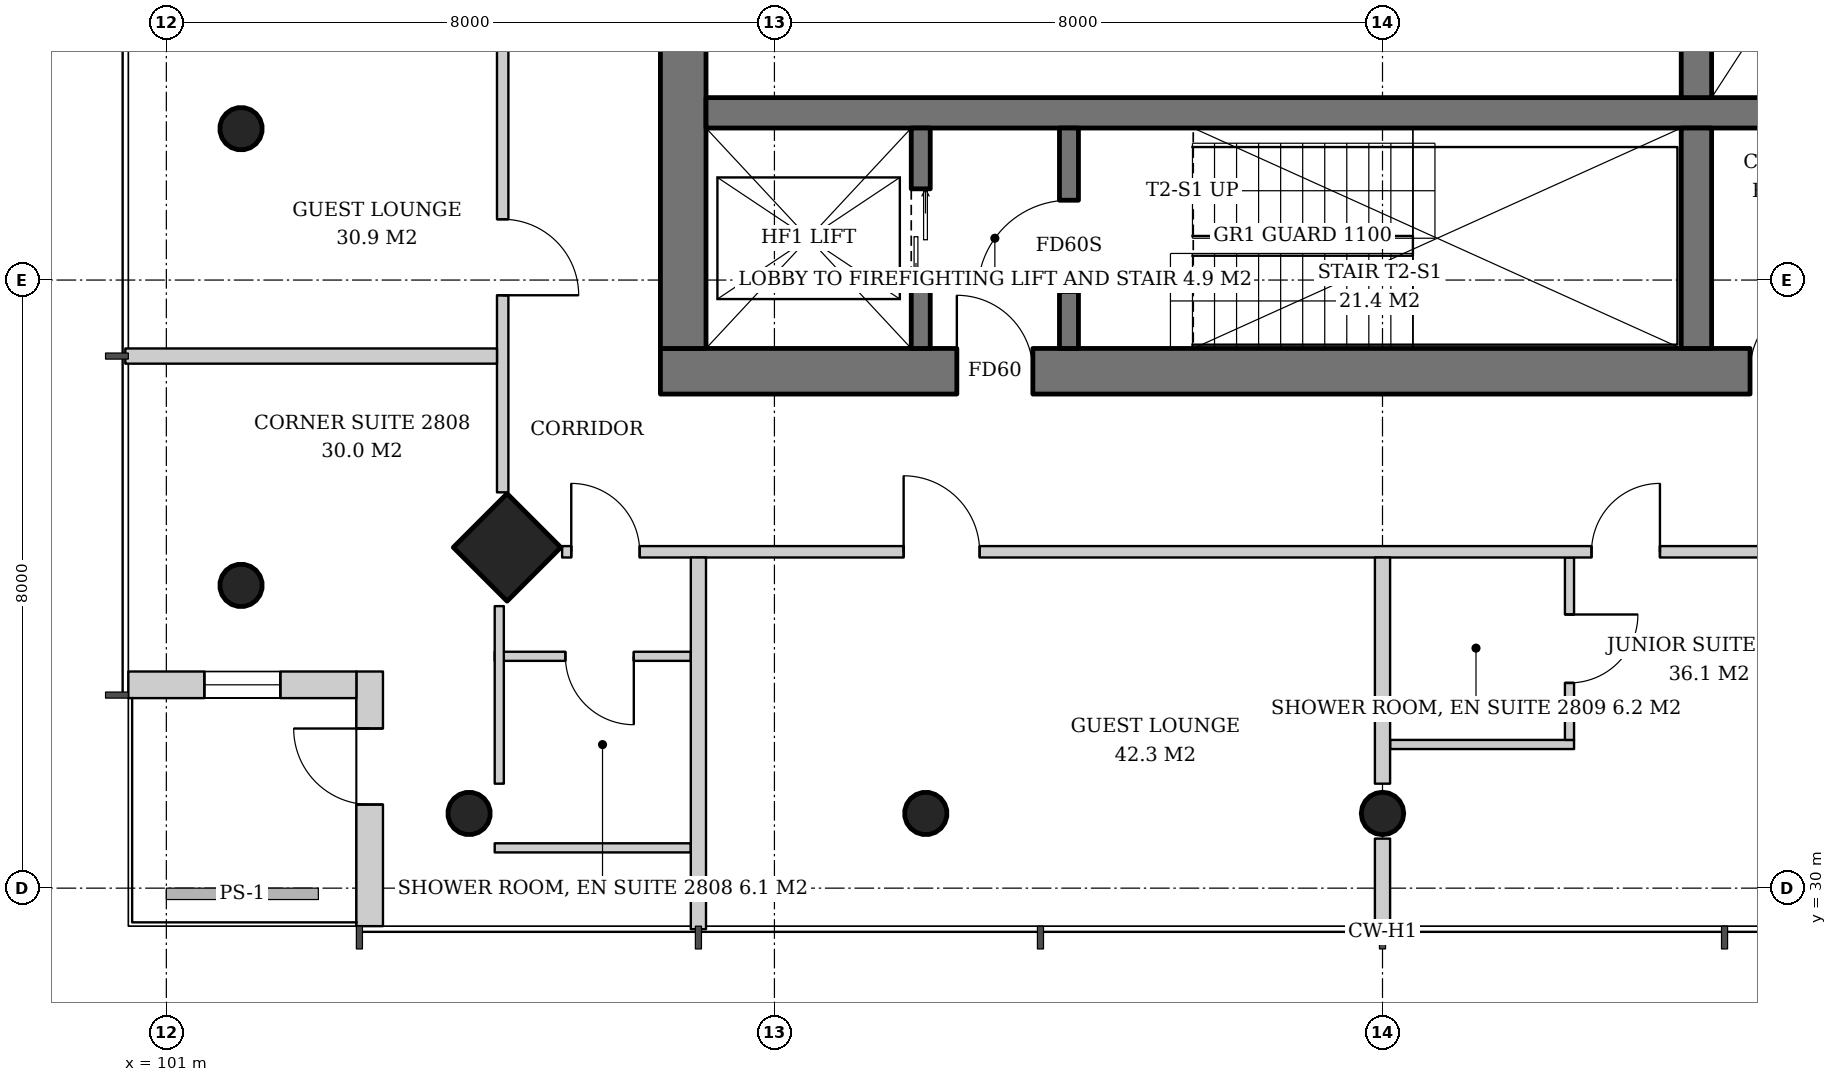
"""IFC4 building model, lengths in metres.
Left out: names, types, materials, properties, quantities, classifications, styles, units other than length and angle.
Written with IfcOpenShell. Run it as: python <this file> out.ifc"""

import sys

from ifc_helpers import new_model, si_unit, direction, frame, frame_2d, origin, origin_2d, place, context, subcontext, project, spatial, rectangle, hollow_circle, extrude, element, fill, save


model = new_model("IFC4")
c1 = context("Model", 3, precision=1e-05, world=origin(), true_north=direction((0.0, 1.0)))
c2 = subcontext(c1, "Body", "Model", "MODEL_VIEW")
j1 = project(units=[si_unit("LENGTHUNIT", "METRE"), si_unit("PLANEANGLEUNIT", "RADIAN")], contexts=[c1])
p1 = place(None, origin())
s1 = spatial("IfcSite", under=j1, at=p1, CompositionType="ELEMENT")
p2 = place(p1, origin())
s2 = spatial("IfcBuilding", under=s1, at=p2, CompositionType="ELEMENT")
p3 = place(p2, frame((0.0, 0.0, 112.2)))
s3 = spatial("IfcBuildingStorey", under=s2, at=p3, CompositionType="ELEMENT", Elevation=112.2)
p4 = place(p3, frame((105.431, 34.431, 0.0), z_axis=(0.042965756413, 0.042965756413, 0.998152236661), x_axis=(-0.707106781187, 0.707106781187, 0.0)))
e1 = element("IfcColumn", 1, at=p4, inside=s3, PredefinedType="COLUMN", context=c2, shape_type="SweptSolid", body=[
    extrude(rectangle(XDim=1.0, YDim=1.0, at=origin_2d()), origin(), (0.0, 0.0, 1.0), 3.807),
])
p5 = place(p3, frame((101.931, 33.931, 0.0), z_axis=(0.042965756413, 0.042965756413, 0.998152236661), x_axis=(-0.707106781187, 0.707106781187, 0.0)))
e2 = element("IfcColumn", 2, at=p5, inside=s3, PredefinedType="COLUMN", context=c2, shape_type="SweptSolid", body=[
    extrude(hollow_circle(Radius=0.28, WallThickness=0.02, at=origin_2d()), origin(), (0.0, 0.0, 1.0), 3.807),
])
p6 = place(p3, frame((101.931, 39.966, 0.0), z_axis=(0.042995531285, 0.021497765643, 0.998843946952), x_axis=(-0.4472135955, 0.894427191, 0.0)))
e3 = element("IfcColumn", 3, at=p6, inside=s3, PredefinedType="COLUMN", context=c2, shape_type="SweptSolid", body=[
    extrude(hollow_circle(Radius=0.28, WallThickness=0.02, at=origin_2d()), origin(), (0.0, 0.0, 1.0), 3.804),
])
p7 = place(p3, frame((104.931, 30.931, 0.0), z_axis=(0.042965756413, 0.042965756413, 0.998152236661), x_axis=(-0.707106781187, 0.707106781187, 0.0)))
e4 = element("IfcColumn", 4, at=p7, inside=s3, PredefinedType="COLUMN", context=c2, shape_type="SweptSolid", body=[
    extrude(hollow_circle(Radius=0.28, WallThickness=0.02, at=origin_2d()), origin(), (0.0, 0.0, 1.0), 3.807),
])
p8 = place(p3, frame((110.966, 30.931, 0.0), z_axis=(0.021497765643, 0.042995531285, 0.998843946952), x_axis=(-0.894427191, 0.4472135955, 0.0)))
e5 = element("IfcColumn", 5, at=p8, inside=s3, PredefinedType="COLUMN", context=c2, shape_type="SweptSolid", body=[
    extrude(hollow_circle(Radius=0.28, WallThickness=0.02, at=origin_2d()), origin(), (0.0, 0.0, 1.0), 3.804),
])
p9 = place(p3, frame((117.0, 30.931, 0.0), z_axis=(0.0, 0.043005470007, 0.999074836811), x_axis=(-1.0, 0.0, 0.0)))
e6 = element("IfcColumn", 6, at=p9, inside=s3, PredefinedType="COLUMN", context=c2, shape_type="SweptSolid", body=[
    extrude(hollow_circle(Radius=0.28, WallThickness=0.02, at=origin_2d()), origin(), (0.0, 0.0, 1.0), 3.803),
])
p10 = place(p3, frame((107.5, 36.8, 0.0), z_axis=(0.0, 0.0, 1.0), x_axis=(1.0, 0.0, 0.0)))
e7 = element("IfcWall", 7, at=p10, inside=s3, PredefinedType="SHEAR", context=c2, shape_type="SweptSolid", body=[
    extrude(rectangle(XDim=19.0, YDim=0.6, at=frame_2d((9.5, 0.0))), origin(), (0.0, 0.0, 1.0), 3.8),
])
p11 = place(p10, frame((3.9, 0.0, 0.0)))
e8 = element("IfcOpeningElement", 8, at=p11, cuts=e7, PredefinedType="OPENING", context=c2, shape_type="SweptSolid", body=[
    extrude(rectangle(XDim=1.0, YDim=2.1, at=frame_2d((0.5, 1.05))), frame((0.0, 0.31, 0.0), z_axis=(0.0, -1.0, 0.0), x_axis=(1.0, 0.0, 0.0)), (0.0, 0.0, 1.0), 0.62),
])
p12 = place(p10, frame((14.335, 0.0, 0.0)))
e9 = element("IfcOpeningElement", 9, at=p12, cuts=e7, PredefinedType="OPENING", context=c2, shape_type="SweptSolid", body=[
    extrude(rectangle(XDim=1.0, YDim=2.1, at=frame_2d((0.5, 1.05))), frame((0.0, 0.31, 0.0), z_axis=(0.0, -1.0, 0.0), x_axis=(1.0, 0.0, 0.0)), (0.0, 0.0, 1.0), 0.62),
])
p13 = place(p10, frame((16.2, 0.0, 0.0)))
e10 = element("IfcOpeningElement", 10, at=p13, cuts=e7, PredefinedType="OPENING", context=c2, shape_type="SweptSolid", body=[
    extrude(rectangle(XDim=1.0, YDim=2.1, at=frame_2d((0.5, 1.05))), frame((0.0, 0.31, 0.0), z_axis=(0.0, -1.0, 0.0), x_axis=(1.0, 0.0, 0.0)), (0.0, 0.0, 1.0), 0.62),
])
p14 = place(p3, frame((107.8, 37.1, 0.0), z_axis=(0.0, 0.0, 1.0), x_axis=(0.0, 1.0, 0.0)))
e11 = element("IfcWall", 11, at=p14, inside=s3, PredefinedType="SHEAR", context=c2, shape_type="SweptSolid", body=[
    extrude(rectangle(XDim=17.8, YDim=0.6, at=frame_2d((8.9, 0.0))), origin(), (0.0, 0.0, 1.0), 3.8),
])
p15 = place(p14, frame((8.0, 0.0, 0.0)))
e12 = element("IfcOpeningElement", 12, at=p15, cuts=e11, PredefinedType="OPENING", context=c2, shape_type="SweptSolid", body=[
    extrude(rectangle(XDim=1.8, YDim=2.4, at=frame_2d((0.9, 1.2))), frame((0.0, 0.31, 0.0), z_axis=(0.0, -1.0, 0.0), x_axis=(1.0, 0.0, 0.0)), (0.0, 0.0, 1.0), 0.62),
])
p16 = place(p3, frame((108.1, 40.2, 0.0), z_axis=(0.0, 0.0, 1.0), x_axis=(1.0, 0.0, 0.0)))
e13 = element("IfcWall", 13, at=p16, inside=s3, PredefinedType="SHEAR", context=c2, shape_type="SweptSolid", body=[
    extrude(rectangle(XDim=17.8, YDim=0.4, at=frame_2d((8.9, 0.0))), origin(), (0.0, 0.0, 1.0), 3.8),
])
p17 = place(p3, frame((121.13, 37.1, 0.0), z_axis=(0.0, 0.0, 1.0), x_axis=(0.0, 1.0, 0.0)))
e14 = element("IfcWall", 14, at=p17, inside=s3, PredefinedType="SHEAR", context=c2, shape_type="SweptSolid", body=[
    extrude(rectangle(XDim=2.9, YDim=0.4, at=frame_2d((1.45, 0.0))), origin(), (0.0, 0.0, 1.0), 3.8),
])
p18 = place(p3, frame((121.13, 40.4, 0.0), z_axis=(0.0, 0.0, 1.0), x_axis=(0.0, 1.0, 0.0)))
e15 = element("IfcWall", 15, at=p18, inside=s3, PredefinedType="SHEAR", context=c2, shape_type="SweptSolid", body=[
    extrude(rectangle(XDim=11.2, YDim=0.4, at=frame_2d((5.6, 0.0))), origin(), (0.0, 0.0, 1.0), 3.8),
])
p19 = place(p3, frame((103.675, 29.5, 0.0), z_axis=(0.0, 0.0, 1.0), x_axis=(0.0, 1.0, 0.0)))
e16 = element("IfcWall", 16, at=p19, inside=s3, PredefinedType="SOLIDWALL", context=c2, shape_type="SweptSolid", body=[
    extrude(rectangle(XDim=3.35, YDim=0.35, at=frame_2d((1.675, 0.0))), origin(), (0.0, 0.0, 1.0), 3.6),
])
p20 = place(p19, frame((1.6, 0.0, 0.0)))
e17 = element("IfcOpeningElement", 17, at=p20, cuts=e16, PredefinedType="OPENING", context=c2, shape_type="SweptSolid", body=[
    extrude(rectangle(XDim=1.0, YDim=2.4, at=frame_2d((0.5, 1.2))), frame((0.0, 0.185, 0.0), z_axis=(0.0, -1.0, 0.0), x_axis=(1.0, 0.0, 0.0)), (0.0, 0.0, 1.0), 0.37),
])
p21 = place(p3, frame((103.5, 32.675, 0.0), z_axis=(0.0, 0.0, 1.0), x_axis=(-1.0, 0.0, 0.0)))
e18 = element("IfcWall", 18, at=p21, inside=s3, PredefinedType="SOLIDWALL", context=c2, shape_type="SweptSolid", body=[
    extrude(rectangle(XDim=3.0, YDim=0.35, at=frame_2d((1.5, 0.0))), origin(), (0.0, 0.0, 1.0), 3.6),
])
p22 = place(p21, frame((1.0, 0.0, 0.9)))
e19 = element("IfcOpeningElement", 19, at=p22, cuts=e18, PredefinedType="OPENING", context=c2, shape_type="SweptSolid", body=[
    extrude(rectangle(XDim=1.0, YDim=2.4, at=frame_2d((0.5, 1.2))), frame((0.0, 0.185, 0.0), z_axis=(0.0, -1.0, 0.0), x_axis=(1.0, 0.0, 0.0)), (0.0, 0.0, 1.0), 0.37),
])
p23 = place(p3, frame((110.925, 37.1, 0.0), z_axis=(0.0, 0.0, 1.0), x_axis=(0.0, 1.0, 0.0)))
e20 = element("IfcWall", 20, at=p23, inside=s3, PredefinedType="SHEAR", context=c2, shape_type="SweptSolid", body=[
    extrude(rectangle(XDim=2.9, YDim=0.25, at=frame_2d((1.45, 0.0))), origin(), (0.0, 0.0, 1.0), 3.8),
])
p24 = place(p23, frame((0.8, 0.0, 0.0)))
e21 = element("IfcOpeningElement", 21, at=p24, cuts=e20, PredefinedType="OPENING", context=c2, shape_type="SweptSolid", body=[
    extrude(rectangle(XDim=1.3, YDim=2.2, at=frame_2d((0.65, 1.1))), frame((0.0, 0.135, 0.0), z_axis=(0.0, -1.0, 0.0), x_axis=(1.0, 0.0, 0.0)), (0.0, 0.0, 1.0), 0.27),
])
p25 = place(p3, frame((112.875, 37.1, 0.0), z_axis=(0.0, 0.0, 1.0), x_axis=(0.0, 1.0, 0.0)))
e22 = element("IfcWall", 22, at=p25, inside=s3, PredefinedType="SHEAR", context=c2, shape_type="SweptSolid", body=[
    extrude(rectangle(XDim=2.9, YDim=0.25, at=frame_2d((1.45, 0.0))), origin(), (0.0, 0.0, 1.0), 3.8),
])
p26 = place(p25, frame((0.75, 0.0, 0.0)))
e23 = element("IfcOpeningElement", 23, at=p26, cuts=e22, PredefinedType="OPENING", context=c2, shape_type="SweptSolid", body=[
    extrude(rectangle(XDim=1.2, YDim=2.1, at=frame_2d((0.6, 1.05))), frame((0.0, 0.135, 0.0), z_axis=(0.0, -1.0, 0.0), x_axis=(1.0, 0.0, 0.0)), (0.0, 0.0, 1.0), 0.27),
])
p27 = place(p3, frame((105.425, 56.793, 0.0), z_axis=(0.0, 0.0, 1.0), x_axis=(0.0, -1.0, 0.0)))
e24 = element("IfcWall", 24, at=p27, inside=s3, PredefinedType="PARTITIONING", context=c2, shape_type="SweptSolid", body=[
    extrude(rectangle(XDim=21.586, YDim=0.15, at=frame_2d((10.793, 0.0))), origin(), (0.0, 0.0, 1.0), 2.9),
])
p28 = place(p27, frame((0.12, 0.0, 0.0)))
e25 = element("IfcOpeningElement", 25, at=p28, cuts=e24, PredefinedType="OPENING", context=c2, shape_type="SweptSolid", body=[
    extrude(rectangle(XDim=0.9, YDim=2.1, at=frame_2d((0.45, 1.05))), frame((0.0, 0.085, 0.0), z_axis=(0.0, -1.0, 0.0), x_axis=(1.0, 0.0, 0.0)), (0.0, 0.0, 1.0), 0.17),
])
p29 = place(p27, frame((4.543, 0.0, 0.0)))
e26 = element("IfcOpeningElement", 26, at=p29, cuts=e24, PredefinedType="OPENING", context=c2, shape_type="SweptSolid", body=[
    extrude(rectangle(XDim=0.9, YDim=2.1, at=frame_2d((0.45, 1.05))), frame((0.0, 0.085, 0.0), z_axis=(0.0, -1.0, 0.0), x_axis=(1.0, 0.0, 0.0)), (0.0, 0.0, 1.0), 0.17),
])
p30 = place(p27, frame((12.543, 0.0, 0.0)))
e27 = element("IfcOpeningElement", 27, at=p30, cuts=e24, PredefinedType="OPENING", context=c2, shape_type="SweptSolid", body=[
    extrude(rectangle(XDim=1.0, YDim=2.1, at=frame_2d((0.5, 1.05))), frame((0.0, 0.085, 0.0), z_axis=(0.0, -1.0, 0.0), x_axis=(1.0, 0.0, 0.0)), (0.0, 0.0, 1.0), 0.17),
])
p31 = place(p27, frame((17.993, 0.0, 0.0)))
e28 = element("IfcOpeningElement", 28, at=p31, cuts=e24, PredefinedType="OPENING", context=c2, shape_type="SweptSolid", body=[
    extrude(rectangle(XDim=1.0, YDim=2.1, at=frame_2d((0.5, 1.05))), frame((0.0, 0.085, 0.0), z_axis=(0.0, -1.0, 0.0), x_axis=(1.0, 0.0, 0.0)), (0.0, 0.0, 1.0), 0.17),
])
p32 = place(p3, frame((105.35, 37.0, 0.0), z_axis=(0.0, 0.0, 1.0), x_axis=(-1.0, 0.0, 0.0)))
e29 = element("IfcWall", 29, at=p32, inside=s3, PredefinedType="PARTITIONING", context=c2, shape_type="SweptSolid", body=[
    extrude(rectangle(XDim=4.89, YDim=0.2, at=frame_2d((2.445, 0.0))), origin(), (0.0, 0.0, 1.0), 3.2),
])
p33 = place(p3, frame((107.9, 33.05, 0.0), z_axis=(0.0, 0.0, 1.0), x_axis=(-1.0, 0.0, 0.0)))
e30 = element("IfcWall", 30, at=p33, inside=s3, PredefinedType="PARTITIONING", context=c2, shape_type="SweptSolid", body=[
    extrude(rectangle(XDim=2.58, YDim=0.12, at=frame_2d((1.29, 0.0))), origin(), (0.0, 0.0, 1.0), 2.9),
])
p34 = place(p33, frame((0.75, 0.0, 0.0)))
e31 = element("IfcOpeningElement", 31, at=p34, cuts=e30, PredefinedType="OPENING", context=c2, shape_type="SweptSolid", body=[
    extrude(rectangle(XDim=0.9, YDim=2.1, at=frame_2d((0.45, 1.05))), frame((0.0, 0.07, 0.0), z_axis=(0.0, -1.0, 0.0), x_axis=(1.0, 0.0, 0.0)), (0.0, 0.0, 1.0), 0.14),
])
p35 = place(p3, frame((107.9, 30.53, 0.0), z_axis=(0.0, 0.0, 1.0), x_axis=(-1.0, 0.0, 0.0)))
e32 = element("IfcWall", 32, at=p35, inside=s3, PredefinedType="PARTITIONING", context=c2, shape_type="SweptSolid", body=[
    extrude(rectangle(XDim=2.58, YDim=0.12, at=frame_2d((1.29, 0.0))), origin(), (0.0, 0.0, 1.0), 3.6),
])
p36 = place(p3, frame((105.38, 33.71, 0.0), z_axis=(0.0, 0.0, 1.0), x_axis=(0.0, -1.0, 0.0)))
e33 = element("IfcWall", 33, at=p36, inside=s3, PredefinedType="PARTITIONING", context=c2, shape_type="SweptSolid", body=[
    extrude(rectangle(XDim=2.336, YDim=0.12, at=frame_2d((1.168, 0.0))), origin(), (0.0, 0.0, 1.0), 3.2),
])
p37 = place(p3, frame((117.1, 31.89, 0.0), z_axis=(0.0, 0.0, 1.0), x_axis=(1.0, 0.0, 0.0)))
e34 = element("IfcWall", 34, at=p37, inside=s3, PredefinedType="PARTITIONING", context=c2, shape_type="SweptSolid", body=[
    extrude(rectangle(XDim=2.42, YDim=0.12, at=frame_2d((1.21, 0.0))), origin(), (0.0, 0.0, 1.0), 3.6),
])
p38 = place(p3, frame((119.46, 34.35, 0.0), z_axis=(0.0, 0.0, 1.0), x_axis=(0.0, -1.0, 0.0)))
e35 = element("IfcWall", 35, at=p38, inside=s3, PredefinedType="PARTITIONING", context=c2, shape_type="SweptSolid", body=[
    extrude(rectangle(XDim=2.4, YDim=0.12, at=frame_2d((1.2, 0.0))), origin(), (0.0, 0.0, 1.0), 3.6),
])
p39 = place(p38, frame((0.75, 0.0, 0.0)))
e36 = element("IfcOpeningElement", 36, at=p39, cuts=e35, PredefinedType="OPENING", context=c2, shape_type="SweptSolid", body=[
    extrude(rectangle(XDim=0.9, YDim=2.1, at=frame_2d((0.45, 1.05))), frame((0.0, 0.07, 0.0), z_axis=(0.0, -1.0, 0.0), x_axis=(1.0, 0.0, 0.0)), (0.0, 0.0, 1.0), 0.14),
])
p40 = place(p3, frame((106.207, 34.425, 0.0), z_axis=(0.0, 0.0, 1.0), x_axis=(1.0, 0.0, 0.0)))
e37 = element("IfcWall", 37, at=p40, inside=s3, PredefinedType="PARTITIONING", context=c2, shape_type="SweptSolid", body=[
    extrude(rectangle(XDim=21.586, YDim=0.15, at=frame_2d((10.793, 0.0))), origin(), (0.0, 0.0, 1.0), 2.9),
])
p41 = place(p40, frame((0.12, 0.0, 0.0)))
e38 = element("IfcOpeningElement", 38, at=p41, cuts=e37, PredefinedType="OPENING", context=c2, shape_type="SweptSolid", body=[
    extrude(rectangle(XDim=0.9, YDim=2.1, at=frame_2d((0.45, 1.05))), frame((0.0, 0.085, 0.0), z_axis=(0.0, -1.0, 0.0), x_axis=(1.0, 0.0, 0.0)), (0.0, 0.0, 1.0), 0.17),
])
p42 = place(p40, frame((4.493, 0.0, 0.0)))
e39 = element("IfcOpeningElement", 39, at=p42, cuts=e37, PredefinedType="OPENING", context=c2, shape_type="SweptSolid", body=[
    extrude(rectangle(XDim=1.0, YDim=2.1, at=frame_2d((0.5, 1.05))), frame((0.0, 0.085, 0.0), z_axis=(0.0, -1.0, 0.0), x_axis=(1.0, 0.0, 0.0)), (0.0, 0.0, 1.0), 0.17),
])
p43 = place(p40, frame((13.543, 0.0, 0.0)))
e40 = element("IfcOpeningElement", 40, at=p43, cuts=e37, PredefinedType="OPENING", context=c2, shape_type="SweptSolid", body=[
    extrude(rectangle(XDim=0.9, YDim=2.1, at=frame_2d((0.45, 1.05))), frame((0.0, 0.085, 0.0), z_axis=(0.0, -1.0, 0.0), x_axis=(1.0, 0.0, 0.0)), (0.0, 0.0, 1.0), 0.17),
])
p44 = place(p3, frame((108.0, 34.35, 0.0), z_axis=(0.0, 0.0, 1.0), x_axis=(0.0, -1.0, 0.0)))
e41 = element("IfcWall", 41, at=p44, inside=s3, PredefinedType="PARTITIONING", context=c2, shape_type="SweptSolid", body=[
    extrude(rectangle(XDim=4.89, YDim=0.2, at=frame_2d((2.445, 0.0))), origin(), (0.0, 0.0, 1.0), 2.9),
])
p45 = place(p3, frame((117.0, 34.35, 0.0), z_axis=(0.0, 0.0, 1.0), x_axis=(0.0, -1.0, 0.0)))
e42 = element("IfcWall", 42, at=p45, inside=s3, PredefinedType="PARTITIONING", context=c2, shape_type="SweptSolid", body=[
    extrude(rectangle(XDim=2.976, YDim=0.2, at=frame_2d((1.488, 0.0))), origin(), (0.0, 0.0, 1.0), 3.6),
])
p46 = place(p3, frame((117.0, 30.652, 0.0), z_axis=(0.0, 0.0, 1.0), x_axis=(0.0, -1.0, 0.0)))
e43 = element("IfcWall", 43, at=p46, inside=s3, PredefinedType="PARTITIONING", context=c2, shape_type="SweptSolid", body=[
    extrude(rectangle(XDim=1.192, YDim=0.2, at=frame_2d((0.596, 0.0))), origin(), (0.0, 0.0, 1.0), 3.6),
])
p47 = place(p20, origin())
e44 = element("IfcDoor", 44, at=p47, inside=s3, OperationType="SINGLE_SWING_RIGHT", PredefinedType="DOOR", context=c2, shape_type="SweptSolid", body=[
    extrude(rectangle(XDim=1.0, YDim=2.4, at=frame_2d((0.5, 1.2))), frame((0.0, 0.025, 0.0), z_axis=(0.0, -1.0, 0.0), x_axis=(1.0, 0.0, 0.0)), (0.0, 0.0, 1.0), 0.05),
])
fill(e17, e44)
p48 = place(p22, origin())
e45 = element("IfcWindow", 45, at=p48, inside=s3, PartitioningType="SINGLE_PANEL", PredefinedType="WINDOW", context=c2, shape_type="SweptSolid", body=[
    extrude(rectangle(XDim=1.0, YDim=2.4, at=frame_2d((0.5, 1.2))), frame((0.0, 0.03, 0.0), z_axis=(0.0, -1.0, 0.0), x_axis=(1.0, 0.0, 0.0)), (0.0, 0.0, 1.0), 0.06),
])
fill(e19, e45)
p49 = place(p24, origin())
e46 = element("IfcDoor", 46, at=p49, inside=s3, OperationType="DOUBLE_DOOR_SLIDING", PredefinedType="DOOR", context=c2, shape_type="SweptSolid", body=[
    extrude(rectangle(XDim=1.3, YDim=2.2, at=frame_2d((0.65, 1.1))), frame((0.0, 0.025, 0.0), z_axis=(0.0, -1.0, 0.0), x_axis=(1.0, 0.0, 0.0)), (0.0, 0.0, 1.0), 0.05),
])
fill(e21, e46)
p50 = place(p26, origin())
e47 = element("IfcDoor", 47, at=p50, inside=s3, OperationType="SINGLE_SWING_LEFT", PredefinedType="DOOR", context=c2, shape_type="SweptSolid", body=[
    extrude(rectangle(XDim=1.2, YDim=2.1, at=frame_2d((0.6, 1.05))), frame((0.0, 0.025, 0.0), z_axis=(0.0, -1.0, 0.0), x_axis=(1.0, 0.0, 0.0)), (0.0, 0.0, 1.0), 0.05),
])
fill(e23, e47)
p51 = place(p11, origin())
e48 = element("IfcDoor", 48, at=p51, inside=s3, OperationType="SINGLE_SWING_LEFT", PredefinedType="DOOR", context=c2, shape_type="SweptSolid", body=[
    extrude(rectangle(XDim=1.0, YDim=2.1, at=frame_2d((0.5, 1.05))), frame((0.0, 0.025, 0.0), z_axis=(0.0, -1.0, 0.0), x_axis=(1.0, 0.0, 0.0)), (0.0, 0.0, 1.0), 0.05),
])
fill(e8, e48)
p52 = place(p12, origin())
e49 = element("IfcDoor", 49, at=p52, inside=s3, OperationType="SINGLE_SWING_RIGHT", PredefinedType="DOOR", context=c2, shape_type="SweptSolid", body=[
    extrude(rectangle(XDim=1.0, YDim=2.1, at=frame_2d((0.5, 1.05))), frame((0.0, 0.29, 0.0), z_axis=(0.0, -1.0, 0.0), x_axis=(1.0, 0.0, 0.0)), (0.0, 0.0, 1.0), 0.05),
])
fill(e9, e49)
p53 = place(p31, origin())
e50 = element("IfcDoor", 50, at=p53, inside=s3, OperationType="SINGLE_SWING_RIGHT", PredefinedType="DOOR", context=c2, shape_type="SweptSolid", body=[
    extrude(rectangle(XDim=1.0, YDim=2.1, at=frame_2d((0.5, 1.05))), frame((0.0, 0.025, 0.0), z_axis=(0.0, -1.0, 0.0), x_axis=(1.0, 0.0, 0.0)), (0.0, 0.0, 1.0), 0.05),
])
fill(e28, e50)
p54 = place(p34, origin())
e51 = element("IfcDoor", 51, at=p54, inside=s3, OperationType="SINGLE_SWING_LEFT", PredefinedType="DOOR", context=c2, shape_type="SweptSolid", body=[
    extrude(rectangle(XDim=0.9, YDim=2.1, at=frame_2d((0.45, 1.05))), frame((0.0, 0.025, 0.0), z_axis=(0.0, -1.0, 0.0), x_axis=(1.0, 0.0, 0.0)), (0.0, 0.0, 1.0), 0.05),
])
fill(e31, e51)
p55 = place(p39, origin())
e52 = element("IfcDoor", 52, at=p55, inside=s3, OperationType="SINGLE_SWING_LEFT", PredefinedType="DOOR", context=c2, shape_type="SweptSolid", body=[
    extrude(rectangle(XDim=0.9, YDim=2.1, at=frame_2d((0.45, 1.05))), frame((0.0, 0.025, 0.0), z_axis=(0.0, -1.0, 0.0), x_axis=(1.0, 0.0, 0.0)), (0.0, 0.0, 1.0), 0.05),
])
fill(e36, e52)
p56 = place(p41, origin())
e53 = element("IfcDoor", 53, at=p56, inside=s3, OperationType="SINGLE_SWING_LEFT", PredefinedType="DOOR", context=c2, shape_type="SweptSolid", body=[
    extrude(rectangle(XDim=0.9, YDim=2.1, at=frame_2d((0.45, 1.05))), frame((0.0, 0.025, 0.0), z_axis=(0.0, -1.0, 0.0), x_axis=(1.0, 0.0, 0.0)), (0.0, 0.0, 1.0), 0.05),
])
fill(e38, e53)
p57 = place(p42, origin())
e54 = element("IfcDoor", 54, at=p57, inside=s3, OperationType="SINGLE_SWING_LEFT", PredefinedType="DOOR", context=c2, shape_type="SweptSolid", body=[
    extrude(rectangle(XDim=1.0, YDim=2.1, at=frame_2d((0.5, 1.05))), frame((0.0, 0.025, 0.0), z_axis=(0.0, -1.0, 0.0), x_axis=(1.0, 0.0, 0.0)), (0.0, 0.0, 1.0), 0.05),
])
fill(e39, e54)
p58 = place(p43, origin())
e55 = element("IfcDoor", 55, at=p58, inside=s3, OperationType="SINGLE_SWING_RIGHT", PredefinedType="DOOR", context=c2, shape_type="SweptSolid", body=[
    extrude(rectangle(XDim=0.9, YDim=2.1, at=frame_2d((0.45, 1.05))), frame((0.0, 0.025, 0.0), z_axis=(0.0, -1.0, 0.0), x_axis=(1.0, 0.0, 0.0)), (0.0, 0.0, 1.0), 0.05),
])
fill(e40, e55)
save(model, sys.argv[1])
